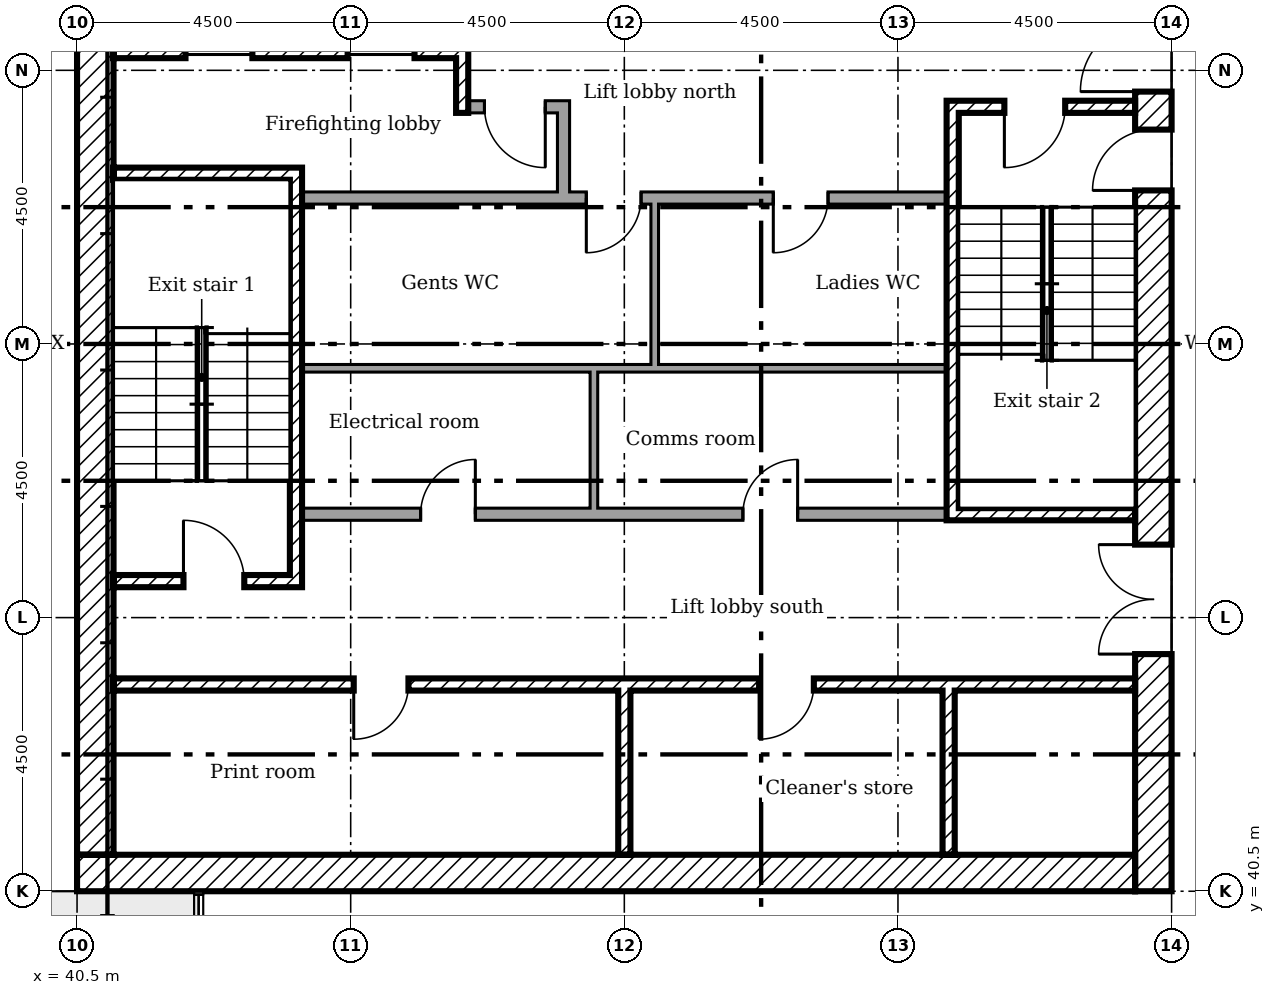
"""IFC4 building model, lengths in metres.
Left out: names, types, materials, properties, quantities, classifications, styles, units other than length and angle.
Written with IfcOpenShell. Run it as: python <this file> out.ifc"""

import sys

from ifc_helpers import new_model, si_unit, direction, frame, frame_2d, origin, place, context, subcontext, project, spatial, rectangle, extrude, element, fill, save


model = new_model("IFC4")
c1 = context("Model", 3, precision=1e-05, world=origin(), true_north=direction((0.0, 1.0)))
c2 = subcontext(c1, "Body", "Model", "MODEL_VIEW")
j1 = project(units=[si_unit("LENGTHUNIT", "METRE"), si_unit("PLANEANGLEUNIT", "RADIAN")], contexts=[c1])
p1 = place(None, origin())
s1 = spatial("IfcSite", under=j1, at=p1, CompositionType="ELEMENT")
p2 = place(p1, origin())
s2 = spatial("IfcBuilding", under=s1, at=p2, CompositionType="ELEMENT")
p3 = place(p2, frame((0.0, 0.0, 151.0)))
s3 = spatial("IfcBuildingStorey", under=s2, at=p3, CompositionType="ELEMENT", Elevation=151.0)
p4 = place(p3, frame((58.2, 40.5, 0.0), z_axis=(0.0, 0.0, 1.0), x_axis=(0.0, 1.0, 0.0)))
e1 = element("IfcWall", 1, at=p4, inside=s3, PredefinedType="SHEAR", context=c2, shape_type="SweptSolid", body=[
    extrude(rectangle(XDim=18.0, YDim=0.6, at=frame_2d((9.0, 0.0))), origin(), (0.0, 0.0, 1.0), 3.35),
])
p5 = place(p4, frame((13.15, 0.0, 0.0)))
e2 = element("IfcOpeningElement", 2, at=p5, cuts=e1, PredefinedType="OPENING", context=c2, shape_type="SweptSolid", body=[
    extrude(rectangle(XDim=1.2, YDim=2.1, at=frame_2d((0.6, 1.05))), frame((0.0, 0.31, 0.0), z_axis=(0.0, -1.0, 0.0), x_axis=(1.0, 0.0, 0.0)), (0.0, 0.0, 1.0), 0.62),
])
p6 = place(p4, frame((3.9, 0.0, 0.0)))
e3 = element("IfcOpeningElement", 3, at=p6, cuts=e1, PredefinedType="OPENING", context=c2, shape_type="SweptSolid", body=[
    extrude(rectangle(XDim=1.8, YDim=2.1, at=frame_2d((0.9, 1.05))), frame((0.0, 0.31, 0.0), z_axis=(0.0, -1.0, 0.0), x_axis=(1.0, 0.0, 0.0)), (0.0, 0.0, 1.0), 0.62),
])
p7 = place(p4, frame((11.525, 0.0, 0.0)))
e4 = element("IfcOpeningElement", 4, at=p7, cuts=e1, PredefinedType="OPENING", context=c2, shape_type="SweptSolid", body=[
    extrude(rectangle(XDim=1.0, YDim=2.1, at=frame_2d((0.5, 1.05))), frame((0.0, 0.31, 0.0), z_axis=(0.0, -1.0, 0.0), x_axis=(1.0, 0.0, 0.0)), (0.0, 0.0, 1.0), 0.62),
])
p8 = place(p3, frame((40.5, 40.8, 0.0)))
e5 = element("IfcWall", 5, at=p8, inside=s3, PredefinedType="SHEAR", context=c2, shape_type="SweptSolid", body=[
    extrude(rectangle(XDim=17.4, YDim=0.6, at=frame_2d((8.7, 0.0))), origin(), (0.0, 0.0, 1.0), 3.35),
])
p9 = place(p3, frame((40.8, 41.1, 0.0), z_axis=(0.0, 0.0, 1.0), x_axis=(0.0, 1.0, 0.0)))
e6 = element("IfcWall", 6, at=p9, inside=s3, PredefinedType="SHEAR", context=c2, shape_type="SweptSolid", body=[
    extrude(rectangle(XDim=16.8, YDim=0.6, at=frame_2d((8.4, 0.0))), origin(), (0.0, 0.0, 1.0), 3.35),
])
p10 = place(p3, frame((46.833, 57.9, 0.0), z_axis=(0.0, 0.0, 1.0), x_axis=(0.0, -1.0, 0.0)))
e7 = element("IfcWall", 7, at=p10, inside=s3, PredefinedType="SHEAR", context=c2, shape_type="SweptSolid", body=[
    extrude(rectangle(XDim=4.6, YDim=0.2, at=frame_2d((2.3, 0.0))), origin(), (0.0, 0.0, 1.0), 3.35),
])
for number, where, z_axis, x_axis in (
    (8, (49.5, 41.1, 0.0), (0.0, 0.0, 1.0), (0.0, 1.0, 0.0)),
    (9, (54.833, 41.1, 0.0), (0.0, 0.0, 1.0), (0.0, 1.0, 0.0)),
):
    element("IfcWall", number, at=place(p3, frame(where, z_axis=z_axis, x_axis=x_axis)), inside=s3, PredefinedType="SHEAR", context=c2, shape_type="SweptSolid", body=[
        extrude(rectangle(XDim=2.7, YDim=0.2, at=frame_2d((1.35, 0.0))), origin(), (0.0, 0.0, 1.0), 3.35),
    ])
p11 = place(p3, frame((48.5, 51.9, 0.0), z_axis=(0.0, 0.0, 1.0), x_axis=(0.0, 1.0, 0.0)))
e10 = element("IfcWall", 10, at=p11, inside=s3, PredefinedType="PARTITIONING", context=c2, shape_type="SweptSolid", body=[
    extrude(rectangle(XDim=1.6, YDim=0.2, at=frame_2d((0.8, 0.0))), origin(), (0.0, 0.0, 1.0), 3.35),
])
p12 = place(p3, frame((46.933, 53.4, 0.0)))
e11 = element("IfcWall", 11, at=p12, inside=s3, PredefinedType="PARTITIONING", context=c2, shape_type="SweptSolid", body=[
    extrude(rectangle(XDim=1.467, YDim=0.2, at=frame_2d((0.733, 0.0))), origin(), (0.0, 0.0, 1.0), 3.35),
])
p13 = place(p12, frame((0.267, 0.0, 0.0)))
e12 = element("IfcOpeningElement", 12, at=p13, cuts=e11, PredefinedType="OPENING", context=c2, shape_type="SweptSolid", body=[
    extrude(rectangle(XDim=1.0, YDim=2.1, at=frame_2d((0.5, 1.05))), frame((0.0, 0.11, 0.0), z_axis=(0.0, -1.0, 0.0), x_axis=(1.0, 0.0, 0.0)), (0.0, 0.0, 1.0), 0.22),
])
p14 = place(p3, frame((41.1, 54.3, 0.0)))
e13 = element("IfcWall", 13, at=p14, inside=s3, PredefinedType="SHEAR", context=c2, shape_type="SweptSolid", body=[
    extrude(rectangle(XDim=5.633, YDim=0.2, at=frame_2d((2.817, 0.0))), origin(), (0.0, 0.0, 1.0), 3.35),
])
p15 = place(p14, frame((1.183, 0.0, 0.0)))
e14 = element("IfcOpeningElement", 14, at=p15, cuts=e13, PredefinedType="OPENING", context=c2, shape_type="SweptSolid", body=[
    extrude(rectangle(XDim=1.1, YDim=2.1, at=frame_2d((0.55, 1.05))), frame((0.0, 0.11, 0.0), z_axis=(0.0, -1.0, 0.0), x_axis=(1.0, 0.0, 0.0)), (0.0, 0.0, 1.0), 0.22),
])
p16 = place(p14, frame((3.85, 0.0, 0.0)))
e15 = element("IfcOpeningElement", 15, at=p16, cuts=e13, PredefinedType="OPENING", context=c2, shape_type="SweptSolid", body=[
    extrude(rectangle(XDim=1.1, YDim=2.1, at=frame_2d((0.55, 1.05))), frame((0.0, 0.11, 0.0), z_axis=(0.0, -1.0, 0.0), x_axis=(1.0, 0.0, 0.0)), (0.0, 0.0, 1.0), 0.22),
])
p17 = place(p3, frame((41.1, 43.9, 0.0)))
e16 = element("IfcWall", 16, at=p17, inside=s3, PredefinedType="SHEAR", context=c2, shape_type="SweptSolid", body=[
    extrude(rectangle(XDim=16.8, YDim=0.2, at=frame_2d((8.4, 0.0))), origin(), (0.0, 0.0, 1.0), 3.35),
])
p18 = place(p17, frame((3.95, 0.0, 0.0)))
e17 = element("IfcOpeningElement", 17, at=p18, cuts=e16, PredefinedType="OPENING", context=c2, shape_type="SweptSolid", body=[
    extrude(rectangle(XDim=0.9, YDim=2.1, at=frame_2d((0.45, 1.05))), frame((0.0, 0.11, 0.0), z_axis=(0.0, -1.0, 0.0), x_axis=(1.0, 0.0, 0.0)), (0.0, 0.0, 1.0), 0.22),
])
p19 = place(p17, frame((10.617, 0.0, 0.0)))
e18 = element("IfcOpeningElement", 18, at=p19, cuts=e16, PredefinedType="OPENING", context=c2, shape_type="SweptSolid", body=[
    extrude(rectangle(XDim=0.9, YDim=2.1, at=frame_2d((0.45, 1.05))), frame((0.0, 0.11, 0.0), z_axis=(0.0, -1.0, 0.0), x_axis=(1.0, 0.0, 0.0)), (0.0, 0.0, 1.0), 0.22),
])
p20 = place(p3, frame((44.1, 45.5, 0.0), z_axis=(0.0, 0.0, 1.0), x_axis=(0.0, 1.0, 0.0)))
e19 = element("IfcWall", 19, at=p20, inside=s3, PredefinedType="SHEAR", context=c2, shape_type="SweptSolid", body=[
    extrude(rectangle(XDim=6.9, YDim=0.2, at=frame_2d((3.45, 0.0))), origin(), (0.0, 0.0, 1.0), 3.35),
])
p21 = place(p3, frame((41.1, 52.3, 0.0)))
e20 = element("IfcWall", 20, at=p21, inside=s3, PredefinedType="SHEAR", context=c2, shape_type="SweptSolid", body=[
    extrude(rectangle(XDim=2.9, YDim=0.2, at=frame_2d((1.45, 0.0))), origin(), (0.0, 0.0, 1.0), 3.35),
])
p22 = place(p3, frame((41.1, 45.6, 0.0)))
e21 = element("IfcWall", 21, at=p22, inside=s3, PredefinedType="SHEAR", context=c2, shape_type="SweptSolid", body=[
    extrude(rectangle(XDim=2.9, YDim=0.2, at=frame_2d((1.45, 0.0))), origin(), (0.0, 0.0, 1.0), 3.35),
])
p23 = place(p22, frame((1.15, 0.0, 0.0)))
e22 = element("IfcOpeningElement", 22, at=p23, cuts=e21, PredefinedType="OPENING", context=c2, shape_type="SweptSolid", body=[
    extrude(rectangle(XDim=1.0, YDim=2.1, at=frame_2d((0.5, 1.05))), frame((0.0, 0.11, 0.0), z_axis=(0.0, -1.0, 0.0), x_axis=(1.0, 0.0, 0.0)), (0.0, 0.0, 1.0), 0.22),
])
p24 = place(p3, frame((54.8, 53.4, 0.0)))
e23 = element("IfcWall", 23, at=p24, inside=s3, PredefinedType="SHEAR", context=c2, shape_type="SweptSolid", body=[
    extrude(rectangle(XDim=3.1, YDim=0.2, at=frame_2d((1.55, 0.0))), origin(), (0.0, 0.0, 1.0), 3.35),
])
p25 = place(p24, frame((0.95, 0.0, 0.0)))
e24 = element("IfcOpeningElement", 24, at=p25, cuts=e23, PredefinedType="OPENING", context=c2, shape_type="SweptSolid", body=[
    extrude(rectangle(XDim=1.0, YDim=2.1, at=frame_2d((0.5, 1.05))), frame((0.0, 0.11, 0.0), z_axis=(0.0, -1.0, 0.0), x_axis=(1.0, 0.0, 0.0)), (0.0, 0.0, 1.0), 0.22),
])
p26 = place(p3, frame((54.8, 46.7, 0.0)))
e25 = element("IfcWall", 25, at=p26, inside=s3, PredefinedType="SHEAR", context=c2, shape_type="SweptSolid", body=[
    extrude(rectangle(XDim=3.1, YDim=0.2, at=frame_2d((1.55, 0.0))), origin(), (0.0, 0.0, 1.0), 3.35),
])
p27 = place(p3, frame((54.9, 46.8, 0.0), z_axis=(0.0, 0.0, 1.0), x_axis=(0.0, 1.0, 0.0)))
e26 = element("IfcWall", 26, at=p27, inside=s3, PredefinedType="SHEAR", context=c2, shape_type="SweptSolid", body=[
    extrude(rectangle(XDim=6.5, YDim=0.2, at=frame_2d((3.25, 0.0))), origin(), (0.0, 0.0, 1.0), 3.35),
])
p28 = place(p3, frame((44.2, 51.9, 0.0)))
e27 = element("IfcWall", 27, at=p28, inside=s3, PredefinedType="PARTITIONING", context=c2, shape_type="SweptSolid", body=[
    extrude(rectangle(XDim=10.6, YDim=0.2, at=frame_2d((5.3, 0.0))), origin(), (0.0, 0.0, 1.0), 3.35),
])
p29 = place(p28, frame((4.675, 0.0, 0.0)))
e28 = element("IfcOpeningElement", 28, at=p29, cuts=e27, PredefinedType="OPENING", context=c2, shape_type="SweptSolid", body=[
    extrude(rectangle(XDim=0.9, YDim=2.1, at=frame_2d((0.45, 1.05))), frame((0.0, 0.11, 0.0), z_axis=(0.0, -1.0, 0.0), x_axis=(1.0, 0.0, 0.0)), (0.0, 0.0, 1.0), 0.22),
])
p30 = place(p28, frame((7.75, 0.0, 0.0)))
e29 = element("IfcOpeningElement", 29, at=p30, cuts=e27, PredefinedType="OPENING", context=c2, shape_type="SweptSolid", body=[
    extrude(rectangle(XDim=0.9, YDim=2.1, at=frame_2d((0.45, 1.05))), frame((0.0, 0.11, 0.0), z_axis=(0.0, -1.0, 0.0), x_axis=(1.0, 0.0, 0.0)), (0.0, 0.0, 1.0), 0.22),
])
p31 = place(p3, frame((44.2, 46.7, 0.0)))
e30 = element("IfcWall", 30, at=p31, inside=s3, PredefinedType="PARTITIONING", context=c2, shape_type="SweptSolid", body=[
    extrude(rectangle(XDim=10.6, YDim=0.2, at=frame_2d((5.3, 0.0))), origin(), (0.0, 0.0, 1.0), 3.35),
])
p32 = place(p31, frame((1.95, 0.0, 0.0)))
e31 = element("IfcOpeningElement", 31, at=p32, cuts=e30, PredefinedType="OPENING", context=c2, shape_type="SweptSolid", body=[
    extrude(rectangle(XDim=0.9, YDim=2.1, at=frame_2d((0.45, 1.05))), frame((0.0, 0.11, 0.0), z_axis=(0.0, -1.0, 0.0), x_axis=(1.0, 0.0, 0.0)), (0.0, 0.0, 1.0), 0.22),
])
p33 = place(p31, frame((7.25, 0.0, 0.0)))
e32 = element("IfcOpeningElement", 32, at=p33, cuts=e30, PredefinedType="OPENING", context=c2, shape_type="SweptSolid", body=[
    extrude(rectangle(XDim=0.9, YDim=2.1, at=frame_2d((0.45, 1.05))), frame((0.0, 0.11, 0.0), z_axis=(0.0, -1.0, 0.0), x_axis=(1.0, 0.0, 0.0)), (0.0, 0.0, 1.0), 0.22),
])
p34 = place(p3, frame((49.0, 46.8, 0.0), z_axis=(0.0, 0.0, 1.0), x_axis=(0.0, 1.0, 0.0)))
e33 = element("IfcWall", 33, at=p34, inside=s3, PredefinedType="PARTITIONING", context=c2, shape_type="SweptSolid", body=[
    extrude(rectangle(XDim=2.363, YDim=0.125, at=frame_2d((1.181, 0.0))), origin(), (0.0, 0.0, 1.0), 3.35),
])
p35 = place(p3, frame((49.0, 49.1, 0.0), z_axis=(0.0, 0.0, 1.0), x_axis=(-1.0, 0.0, 0.0)))
e34 = element("IfcWall", 34, at=p35, inside=s3, PredefinedType="PARTITIONING", context=c2, shape_type="SweptSolid", body=[
    extrude(rectangle(XDim=4.8, YDim=0.125, at=frame_2d((2.4, 0.0))), origin(), (0.0, 0.0, 1.0), 3.35),
])
p36 = place(p3, frame((50.062, 49.1, 0.0), z_axis=(0.0, 0.0, 1.0), x_axis=(-1.0, 0.0, 0.0)))
e35 = element("IfcWall", 35, at=p36, inside=s3, PredefinedType="PARTITIONING", context=c2, shape_type="SweptSolid", body=[
    extrude(rectangle(XDim=1.0, YDim=0.125, at=frame_2d((0.5, 0.0))), origin(), (0.0, 0.0, 1.0), 3.35),
])
p37 = place(p3, frame((54.8, 49.1, 0.0), z_axis=(0.0, 0.0, 1.0), x_axis=(-1.0, 0.0, 0.0)))
e36 = element("IfcWall", 36, at=p37, inside=s3, PredefinedType="PARTITIONING", context=c2, shape_type="SweptSolid", body=[
    extrude(rectangle(XDim=4.8, YDim=0.125, at=frame_2d((2.4, 0.0))), origin(), (0.0, 0.0, 1.0), 3.35),
])
p38 = place(p3, frame((50.0, 49.163, 0.0), z_axis=(0.0, 0.0, 1.0), x_axis=(0.0, 1.0, 0.0)))
e37 = element("IfcWall", 37, at=p38, inside=s3, PredefinedType="PARTITIONING", context=c2, shape_type="SweptSolid", body=[
    extrude(rectangle(XDim=2.637, YDim=0.125, at=frame_2d((1.319, 0.0))), origin(), (0.0, 0.0, 1.0), 3.35),
])
p39 = place(p5, origin())
e38 = element("IfcDoor", 38, at=p39, inside=s3, OperationType="SINGLE_SWING_RIGHT", PredefinedType="DOOR", context=c2, shape_type="SweptSolid", body=[
    extrude(rectangle(XDim=1.2, YDim=2.1, at=frame_2d((0.6, 1.05))), frame((0.0, 0.025, 0.0), z_axis=(0.0, -1.0, 0.0), x_axis=(1.0, 0.0, 0.0)), (0.0, 0.0, 1.0), 0.05),
])
fill(e2, e38)
p40 = place(p6, origin())
e39 = element("IfcDoor", 39, at=p40, inside=s3, OperationType="DOUBLE_DOOR_SINGLE_SWING", PredefinedType="DOOR", context=c2, shape_type="SweptSolid", body=[
    extrude(rectangle(XDim=1.8, YDim=2.1, at=frame_2d((0.9, 1.05))), frame((0.0, 0.025, 0.0), z_axis=(0.0, -1.0, 0.0), x_axis=(1.0, 0.0, 0.0)), (0.0, 0.0, 1.0), 0.05),
])
fill(e3, e39)
p41 = place(p23, origin())
e40 = element("IfcDoor", 40, at=p41, inside=s3, OperationType="SINGLE_SWING_RIGHT", PredefinedType="DOOR", context=c2, shape_type="SweptSolid", body=[
    extrude(rectangle(XDim=1.0, YDim=2.1, at=frame_2d((0.5, 1.05))), frame((0.0, 0.025, 0.0), z_axis=(0.0, -1.0, 0.0), x_axis=(1.0, 0.0, 0.0)), (0.0, 0.0, 1.0), 0.05),
])
fill(e22, e40)
p42 = place(p25, frame((1.0, 0.0, 0.0), x_axis=(-1.0, 0.0, 0.0)))
e41 = element("IfcDoor", 41, at=p42, inside=s3, OperationType="SINGLE_SWING_LEFT", PredefinedType="DOOR", context=c2, shape_type="SweptSolid", body=[
    extrude(rectangle(XDim=1.0, YDim=2.1, at=frame_2d((0.5, 1.05))), frame((0.0, 0.025, 0.0), z_axis=(0.0, -1.0, 0.0), x_axis=(1.0, 0.0, 0.0)), (0.0, 0.0, 1.0), 0.05),
])
fill(e24, e41)
p43 = place(p7, origin())
e42 = element("IfcDoor", 42, at=p43, inside=s3, OperationType="SINGLE_SWING_RIGHT", PredefinedType="DOOR", context=c2, shape_type="SweptSolid", body=[
    extrude(rectangle(XDim=1.0, YDim=2.1, at=frame_2d((0.5, 1.05))), frame((0.0, 0.025, 0.0), z_axis=(0.0, -1.0, 0.0), x_axis=(1.0, 0.0, 0.0)), (0.0, 0.0, 1.0), 0.05),
])
fill(e4, e42)
p44 = place(p13, frame((1.0, 0.0, 0.0), x_axis=(-1.0, 0.0, 0.0)))
e43 = element("IfcDoor", 43, at=p44, inside=s3, OperationType="SINGLE_SWING_RIGHT", PredefinedType="DOOR", context=c2, shape_type="SweptSolid", body=[
    extrude(rectangle(XDim=1.0, YDim=2.1, at=frame_2d((0.5, 1.05))), frame((0.0, 0.025, 0.0), z_axis=(0.0, -1.0, 0.0), x_axis=(1.0, 0.0, 0.0)), (0.0, 0.0, 1.0), 0.05),
])
fill(e12, e43)
p45 = place(p18, frame((0.9, 0.0, 0.0), x_axis=(-1.0, 0.0, 0.0)))
e44 = element("IfcDoor", 44, at=p45, inside=s3, OperationType="SINGLE_SWING_LEFT", PredefinedType="DOOR", context=c2, shape_type="SweptSolid", body=[
    extrude(rectangle(XDim=0.9, YDim=2.1, at=frame_2d((0.45, 1.05))), frame((0.0, 0.025, 0.0), z_axis=(0.0, -1.0, 0.0), x_axis=(1.0, 0.0, 0.0)), (0.0, 0.0, 1.0), 0.05),
])
fill(e17, e44)
p46 = place(p19, frame((0.9, 0.0, 0.0), x_axis=(-1.0, 0.0, 0.0)))
e45 = element("IfcDoor", 45, at=p46, inside=s3, OperationType="SINGLE_SWING_LEFT", PredefinedType="DOOR", context=c2, shape_type="SweptSolid", body=[
    extrude(rectangle(XDim=0.9, YDim=2.1, at=frame_2d((0.45, 1.05))), frame((0.0, 0.025, 0.0), z_axis=(0.0, -1.0, 0.0), x_axis=(1.0, 0.0, 0.0)), (0.0, 0.0, 1.0), 0.05),
])
fill(e18, e45)
p47 = place(p32, origin())
e46 = element("IfcDoor", 46, at=p47, inside=s3, OperationType="SINGLE_SWING_LEFT", PredefinedType="DOOR", context=c2, shape_type="SweptSolid", body=[
    extrude(rectangle(XDim=0.9, YDim=2.1, at=frame_2d((0.45, 1.05))), frame((0.0, 0.025, 0.0), z_axis=(0.0, -1.0, 0.0), x_axis=(1.0, 0.0, 0.0)), (0.0, 0.0, 1.0), 0.05),
])
fill(e31, e46)
p48 = place(p33, origin())
e47 = element("IfcDoor", 47, at=p48, inside=s3, OperationType="SINGLE_SWING_LEFT", PredefinedType="DOOR", context=c2, shape_type="SweptSolid", body=[
    extrude(rectangle(XDim=0.9, YDim=2.1, at=frame_2d((0.45, 1.05))), frame((0.0, 0.025, 0.0), z_axis=(0.0, -1.0, 0.0), x_axis=(1.0, 0.0, 0.0)), (0.0, 0.0, 1.0), 0.05),
])
fill(e32, e47)
p49 = place(p29, frame((0.9, 0.0, 0.0), x_axis=(-1.0, 0.0, 0.0)))
e48 = element("IfcDoor", 48, at=p49, inside=s3, OperationType="SINGLE_SWING_LEFT", PredefinedType="DOOR", context=c2, shape_type="SweptSolid", body=[
    extrude(rectangle(XDim=0.9, YDim=2.1, at=frame_2d((0.45, 1.05))), frame((0.0, 0.025, 0.0), z_axis=(0.0, -1.0, 0.0), x_axis=(1.0, 0.0, 0.0)), (0.0, 0.0, 1.0), 0.05),
])
fill(e28, e48)
p50 = place(p30, frame((0.9, 0.0, 0.0), x_axis=(-1.0, 0.0, 0.0)))
e49 = element("IfcDoor", 49, at=p50, inside=s3, OperationType="SINGLE_SWING_LEFT", PredefinedType="DOOR", context=c2, shape_type="SweptSolid", body=[
    extrude(rectangle(XDim=0.9, YDim=2.1, at=frame_2d((0.45, 1.05))), frame((0.0, 0.025, 0.0), z_axis=(0.0, -1.0, 0.0), x_axis=(1.0, 0.0, 0.0)), (0.0, 0.0, 1.0), 0.05),
])
fill(e29, e49)
p51 = place(p15, origin())
e50 = element("IfcDoor", 50, at=p51, inside=s3, OperationType="SLIDING_TO_LEFT", PredefinedType="DOOR", context=c2, shape_type="SweptSolid", body=[
    extrude(rectangle(XDim=1.1, YDim=2.1, at=frame_2d((0.55, 1.05))), frame((0.0, 0.025, 0.0), z_axis=(0.0, -1.0, 0.0), x_axis=(1.0, 0.0, 0.0)), (0.0, 0.0, 1.0), 0.05),
])
fill(e14, e50)
p52 = place(p16, origin())
e51 = element("IfcDoor", 51, at=p52, inside=s3, OperationType="SLIDING_TO_LEFT", PredefinedType="DOOR", context=c2, shape_type="SweptSolid", body=[
    extrude(rectangle(XDim=1.1, YDim=2.1, at=frame_2d((0.55, 1.05))), frame((0.0, 0.025, 0.0), z_axis=(0.0, -1.0, 0.0), x_axis=(1.0, 0.0, 0.0)), (0.0, 0.0, 1.0), 0.05),
])
fill(e15, e51)
save(model, sys.argv[1])
